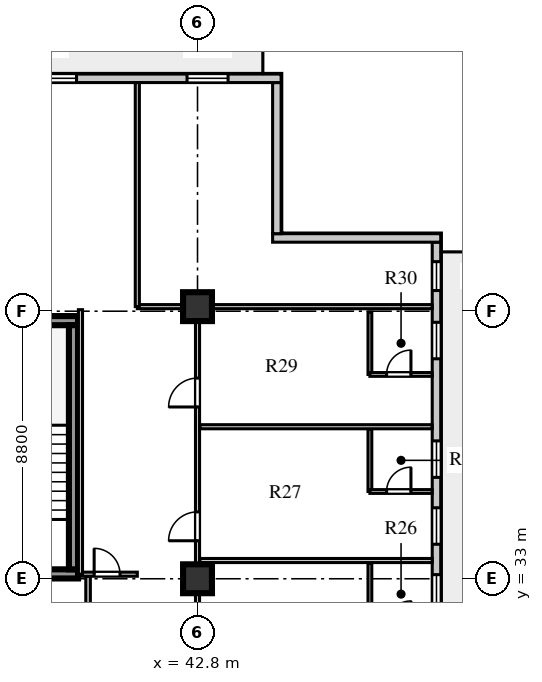
"""IFC4 building model, lengths in metres.
Left out: names, types, materials, properties, quantities, classifications, styles, units other than length and angle.
Written with IfcOpenShell. Run it as: python <this file> out.ifc"""

import sys

from ifc_helpers import new_model, si_unit, direction, frame, frame_2d, origin, origin_2d, place, context, subcontext, project, spatial, rectangle, extrude, element, fill, save


model = new_model("IFC4")
c1 = context("Model", 3, precision=1e-05, world=origin(), true_north=direction((0.0, 1.0)))
c2 = subcontext(c1, "Body", "Model", "MODEL_VIEW")
j1 = project(units=[si_unit("LENGTHUNIT", "METRE"), si_unit("PLANEANGLEUNIT", "RADIAN")], contexts=[c1])
p1 = place(None, origin())
s1 = spatial("IfcSite", under=j1, at=p1, CompositionType="ELEMENT")
p2 = place(p1, origin())
s2 = spatial("IfcBuilding", under=s1, at=p2, CompositionType="ELEMENT")
p3 = place(p2, frame((0.0, 0.0, 188.7)))
s3 = spatial("IfcBuildingStorey", under=s2, at=p3, CompositionType="ELEMENT", Elevation=188.7)
for number, where, z_axis, x_axis in (
    (1, (34.275, 33.16, 0.0), (0.0, 0.0, 1.0), (1.0, 0.0, 0.0)),
    (2, (34.275, 41.49, 0.0), (0.0, 0.0, 1.0), (1.0, 0.0, 0.0)),
):
    element("IfcWall", number, at=place(p3, frame(where, z_axis=z_axis, x_axis=x_axis)), inside=s3, PredefinedType="SHEAR", context=c2, shape_type="SweptSolid", body=[
        extrude(rectangle(XDim=4.595, YDim=0.3, at=frame_2d((2.298, 0.0))), origin(), (0.0, 0.0, 1.0), 3.6),
    ])
p4 = place(p3, frame((38.72, 33.31, 0.0), z_axis=(0.0, 0.0, 1.0), x_axis=(0.0, 1.0, 0.0)))
e3 = element("IfcWall", 3, at=p4, inside=s3, PredefinedType="SHEAR", context=c2, shape_type="SweptSolid", body=[
    extrude(rectangle(XDim=8.03, YDim=0.3, at=frame_2d((4.015, 0.0))), origin(), (0.0, 0.0, 1.0), 3.6),
])
for number, where, z_axis, x_axis in (
    (4, (42.8, 33.0, 0.0), (0.0, 0.0, 1.0), (1.0, 0.0, 0.0)),
    (5, (42.8, 41.95, 0.0), (0.0, 0.0, 1.0), (1.0, 0.0, 0.0)),
):
    element("IfcColumn", number, at=place(p3, frame(where, z_axis=z_axis, x_axis=x_axis)), inside=s3, PredefinedType="COLUMN", context=c2, shape_type="SweptSolid", body=[
        extrude(rectangle(XDim=0.95, YDim=0.95, at=origin_2d()), origin(), (0.0, 0.0, 1.0), 3.6),
    ])
p5 = place(p3, frame((50.66, 13.13, 0.0), z_axis=(0.0, 0.0, 1.0), x_axis=(0.0, 1.0, 0.0)))
e6 = element("IfcWall", 6, at=p5, inside=s3, PredefinedType="STANDARD", context=c2, shape_type="SweptSolid", body=[
    extrude(rectangle(XDim=30.94, YDim=0.28, at=frame_2d((15.47, 0.0))), origin(), (0.0, 0.0, 1.0), 3.6),
])
p6 = place(p5, frame((0.64, 0.0, 0.8)))
e7 = element("IfcOpeningElement", 7, at=p6, cuts=e6, PredefinedType="OPENING", context=c2, shape_type="SweptSolid", body=[
    extrude(rectangle(XDim=0.95, YDim=1.65, at=frame_2d((0.475, 0.825))), frame((0.0, 0.15, 0.0), z_axis=(0.0, -1.0, 0.0), x_axis=(1.0, 0.0, 0.0)), (0.0, 0.0, 1.0), 0.3),
])
p7 = place(p5, frame((2.61, 0.0, 0.0)))
e8 = element("IfcOpeningElement", 8, at=p7, cuts=e6, PredefinedType="OPENING", context=c2, shape_type="SweptSolid", body=[
    extrude(rectangle(XDim=1.0, YDim=2.05, at=frame_2d((0.5, 1.025))), frame((0.0, 0.15, 0.0), z_axis=(0.0, -1.0, 0.0), x_axis=(1.0, 0.0, 0.0)), (0.0, 0.0, 1.0), 0.3),
])
p8 = place(p5, frame((5.005, 0.0, 0.8)))
e9 = element("IfcOpeningElement", 9, at=p8, cuts=e6, PredefinedType="OPENING", context=c2, shape_type="SweptSolid", body=[
    extrude(rectangle(XDim=1.2, YDim=1.75, at=frame_2d((0.6, 0.875))), frame((0.0, 0.15, 0.0), z_axis=(0.0, -1.0, 0.0), x_axis=(1.0, 0.0, 0.0)), (0.0, 0.0, 1.0), 0.3),
])
p9 = place(p5, frame((7.305, 0.0, 0.8)))
e10 = element("IfcOpeningElement", 10, at=p9, cuts=e6, PredefinedType="OPENING", context=c2, shape_type="SweptSolid", body=[
    extrude(rectangle(XDim=1.2, YDim=1.75, at=frame_2d((0.6, 0.875))), frame((0.0, 0.15, 0.0), z_axis=(0.0, -1.0, 0.0), x_axis=(1.0, 0.0, 0.0)), (0.0, 0.0, 1.0), 0.3),
])
p10 = place(p5, frame((9.605, 0.0, 0.8)))
e11 = element("IfcOpeningElement", 11, at=p10, cuts=e6, PredefinedType="OPENING", context=c2, shape_type="SweptSolid", body=[
    extrude(rectangle(XDim=1.2, YDim=1.75, at=frame_2d((0.6, 0.875))), frame((0.0, 0.15, 0.0), z_axis=(0.0, -1.0, 0.0), x_axis=(1.0, 0.0, 0.0)), (0.0, 0.0, 1.0), 0.3),
])
p11 = place(p5, frame((11.905, 0.0, 0.8)))
e12 = element("IfcOpeningElement", 12, at=p11, cuts=e6, PredefinedType="OPENING", context=c2, shape_type="SweptSolid", body=[
    extrude(rectangle(XDim=1.2, YDim=1.75, at=frame_2d((0.6, 0.875))), frame((0.0, 0.15, 0.0), z_axis=(0.0, -1.0, 0.0), x_axis=(1.0, 0.0, 0.0)), (0.0, 0.0, 1.0), 0.3),
])
p12 = place(p5, frame((14.205, 0.0, 0.8)))
e13 = element("IfcOpeningElement", 13, at=p12, cuts=e6, PredefinedType="OPENING", context=c2, shape_type="SweptSolid", body=[
    extrude(rectangle(XDim=1.2, YDim=1.75, at=frame_2d((0.6, 0.875))), frame((0.0, 0.15, 0.0), z_axis=(0.0, -1.0, 0.0), x_axis=(1.0, 0.0, 0.0)), (0.0, 0.0, 1.0), 0.3),
])
p13 = place(p5, frame((16.355, 0.0, 0.8)))
e14 = element("IfcOpeningElement", 14, at=p13, cuts=e6, PredefinedType="OPENING", context=c2, shape_type="SweptSolid", body=[
    extrude(rectangle(XDim=1.5, YDim=2.0, at=frame_2d((0.75, 1.0))), frame((0.0, 0.15, 0.0), z_axis=(0.0, -1.0, 0.0), x_axis=(1.0, 0.0, 0.0)), (0.0, 0.0, 1.0), 0.3),
])
p14 = place(p5, frame((18.805, 0.0, 0.8)))
e15 = element("IfcOpeningElement", 15, at=p14, cuts=e6, PredefinedType="OPENING", context=c2, shape_type="SweptSolid", body=[
    extrude(rectangle(XDim=1.2, YDim=1.75, at=frame_2d((0.6, 0.875))), frame((0.0, 0.15, 0.0), z_axis=(0.0, -1.0, 0.0), x_axis=(1.0, 0.0, 0.0)), (0.0, 0.0, 1.0), 0.3),
])
p15 = place(p5, frame((21.005, 0.0, 0.8)))
e16 = element("IfcOpeningElement", 16, at=p15, cuts=e6, PredefinedType="OPENING", context=c2, shape_type="SweptSolid", body=[
    extrude(rectangle(XDim=1.2, YDim=1.75, at=frame_2d((0.6, 0.875))), frame((0.0, 0.15, 0.0), z_axis=(0.0, -1.0, 0.0), x_axis=(1.0, 0.0, 0.0)), (0.0, 0.0, 1.0), 0.3),
])
p16 = place(p5, frame((23.205, 0.0, 0.8)))
e17 = element("IfcOpeningElement", 17, at=p16, cuts=e6, PredefinedType="OPENING", context=c2, shape_type="SweptSolid", body=[
    extrude(rectangle(XDim=1.2, YDim=1.75, at=frame_2d((0.6, 0.875))), frame((0.0, 0.15, 0.0), z_axis=(0.0, -1.0, 0.0), x_axis=(1.0, 0.0, 0.0)), (0.0, 0.0, 1.0), 0.3),
])
p17 = place(p5, frame((27.105, 0.0, 0.8)))
e18 = element("IfcOpeningElement", 18, at=p17, cuts=e6, PredefinedType="OPENING", context=c2, shape_type="SweptSolid", body=[
    extrude(rectangle(XDim=1.2, YDim=1.75, at=frame_2d((0.6, 0.875))), frame((0.0, 0.15, 0.0), z_axis=(0.0, -1.0, 0.0), x_axis=(1.0, 0.0, 0.0)), (0.0, 0.0, 1.0), 0.3),
])
p18 = place(p5, frame((29.35, 0.0, 0.8)))
e19 = element("IfcOpeningElement", 19, at=p18, cuts=e6, PredefinedType="OPENING", context=c2, shape_type="SweptSolid", body=[
    extrude(rectangle(XDim=0.95, YDim=1.65, at=frame_2d((0.475, 0.825))), frame((0.0, 0.15, 0.0), z_axis=(0.0, -1.0, 0.0), x_axis=(1.0, 0.0, 0.0)), (0.0, 0.0, 1.0), 0.3),
])
p19 = place(p3, frame((50.8, 44.21, 0.0), z_axis=(0.0, 0.0, 1.0), x_axis=(-1.0, 0.0, 0.0)))
e20 = element("IfcWall", 20, at=p19, inside=s3, PredefinedType="STANDARD", context=c2, shape_type="SweptSolid", body=[
    extrude(rectangle(XDim=5.53, YDim=0.28, at=frame_2d((2.765, 0.0))), origin(), (0.0, 0.0, 1.0), 3.6),
])
p20 = place(p3, frame((45.41, 44.35, 0.0), z_axis=(0.0, 0.0, 1.0), x_axis=(0.0, 1.0, 0.0)))
e21 = element("IfcWall", 21, at=p20, inside=s3, PredefinedType="STANDARD", context=c2, shape_type="SweptSolid", body=[
    extrude(rectangle(XDim=4.97, YDim=0.28, at=frame_2d((2.485, 0.0))), origin(), (0.0, 0.0, 1.0), 3.6),
])
p21 = place(p3, frame((45.55, 49.46, 0.0), z_axis=(0.0, 0.0, 1.0), x_axis=(-1.0, 0.0, 0.0)))
e22 = element("IfcWall", 22, at=p21, inside=s3, PredefinedType="STANDARD", context=c2, shape_type="SweptSolid", body=[
    extrude(rectangle(XDim=32.5, YDim=0.28, at=frame_2d((16.25, 0.0))), origin(), (0.0, 0.0, 1.0), 3.6),
])
p22 = place(p21, frame((30.55, 0.0, 0.0)))
e23 = element("IfcOpeningElement", 23, at=p22, cuts=e22, PredefinedType="OPENING", context=c2, shape_type="SweptSolid", body=[
    extrude(rectangle(XDim=1.0, YDim=2.05, at=frame_2d((0.5, 1.025))), frame((0.0, 0.15, 0.0), z_axis=(0.0, -1.0, 0.0), x_axis=(1.0, 0.0, 0.0)), (0.0, 0.0, 1.0), 0.3),
])
p23 = place(p21, frame((24.72, 0.0, 0.8)))
e24 = element("IfcOpeningElement", 24, at=p23, cuts=e22, PredefinedType="OPENING", context=c2, shape_type="SweptSolid", body=[
    extrude(rectangle(XDim=1.5, YDim=2.0, at=frame_2d((0.75, 1.0))), frame((0.0, 0.15, 0.0), z_axis=(0.0, -1.0, 0.0), x_axis=(1.0, 0.0, 0.0)), (0.0, 0.0, 1.0), 0.3),
])
p24 = place(p21, frame((16.045, 0.0, 0.8)))
e25 = element("IfcOpeningElement", 25, at=p24, cuts=e22, PredefinedType="OPENING", context=c2, shape_type="SweptSolid", body=[
    extrude(rectangle(XDim=1.2, YDim=1.75, at=frame_2d((0.6, 0.875))), frame((0.0, 0.15, 0.0), z_axis=(0.0, -1.0, 0.0), x_axis=(1.0, 0.0, 0.0)), (0.0, 0.0, 1.0), 0.3),
])
p25 = place(p21, frame((11.295, 0.0, 0.8)))
e26 = element("IfcOpeningElement", 26, at=p25, cuts=e22, PredefinedType="OPENING", context=c2, shape_type="SweptSolid", body=[
    extrude(rectangle(XDim=1.2, YDim=1.75, at=frame_2d((0.6, 0.875))), frame((0.0, 0.15, 0.0), z_axis=(0.0, -1.0, 0.0), x_axis=(1.0, 0.0, 0.0)), (0.0, 0.0, 1.0), 0.3),
])
p26 = place(p21, frame((6.73, 0.0, 0.8)))
e27 = element("IfcOpeningElement", 27, at=p26, cuts=e22, PredefinedType="OPENING", context=c2, shape_type="SweptSolid", body=[
    extrude(rectangle(XDim=2.1, YDim=1.95, at=frame_2d((1.05, 0.975))), frame((0.0, 0.15, 0.0), z_axis=(0.0, -1.0, 0.0), x_axis=(1.0, 0.0, 0.0)), (0.0, 0.0, 1.0), 0.3),
])
p27 = place(p21, frame((1.745, 0.0, 0.8)))
e28 = element("IfcOpeningElement", 28, at=p27, cuts=e22, PredefinedType="OPENING", context=c2, shape_type="SweptSolid", body=[
    extrude(rectangle(XDim=1.35, YDim=1.9, at=frame_2d((0.675, 0.95))), frame((0.0, 0.15, 0.0), z_axis=(0.0, -1.0, 0.0), x_axis=(1.0, 0.0, 0.0)), (0.0, 0.0, 1.0), 0.3),
])
p28 = place(p3, frame((39.2, 28.86, 0.0), z_axis=(0.0, 0.0, 1.0), x_axis=(0.0, 1.0, 0.0)))
e29 = element("IfcWall", 29, at=p28, inside=s3, PredefinedType="PARTITIONING", context=c2, shape_type="SweptSolid", body=[
    extrude(rectangle(XDim=4.22, YDim=0.15, at=frame_2d((2.11, 0.0))), origin(), (0.0, 0.0, 1.0), 3.6),
])
p29 = place(p3, frame((42.8, 15.25, 0.0), z_axis=(0.0, 0.0, 1.0), x_axis=(0.0, 1.0, 0.0)))
e30 = element("IfcWall", 30, at=p29, inside=s3, PredefinedType="PARTITIONING", context=c2, shape_type="SweptSolid", body=[
    extrude(rectangle(XDim=26.7, YDim=0.135, at=frame_2d((13.35, 0.0))), origin(), (0.0, 0.0, 1.0), 2.95),
])
p30 = place(p29, frame((0.75, 0.0, 0.0)))
e31 = element("IfcOpeningElement", 31, at=p30, cuts=e30, PredefinedType="OPENING", context=c2, shape_type="SweptSolid", body=[
    extrude(rectangle(XDim=0.95, YDim=2.1, at=frame_2d((0.475, 1.05))), frame((0.0, 0.078, 0.0), z_axis=(0.0, -1.0, 0.0), x_axis=(1.0, 0.0, 0.0)), (0.0, 0.0, 1.0), 0.155),
])
p31 = place(p29, frame((5.2, 0.0, 0.0)))
e32 = element("IfcOpeningElement", 32, at=p31, cuts=e30, PredefinedType="OPENING", context=c2, shape_type="SweptSolid", body=[
    extrude(rectangle(XDim=0.95, YDim=2.1, at=frame_2d((0.475, 1.05))), frame((0.0, 0.078, 0.0), z_axis=(0.0, -1.0, 0.0), x_axis=(1.0, 0.0, 0.0)), (0.0, 0.0, 1.0), 0.155),
])
p32 = place(p29, frame((9.8, 0.0, 0.0)))
e33 = element("IfcOpeningElement", 33, at=p32, cuts=e30, PredefinedType="OPENING", context=c2, shape_type="SweptSolid", body=[
    extrude(rectangle(XDim=0.95, YDim=2.1, at=frame_2d((0.475, 1.05))), frame((0.0, 0.078, 0.0), z_axis=(0.0, -1.0, 0.0), x_axis=(1.0, 0.0, 0.0)), (0.0, 0.0, 1.0), 0.155),
])
p33 = place(p29, frame((14.4, 0.0, 0.0)))
e34 = element("IfcOpeningElement", 34, at=p33, cuts=e30, PredefinedType="OPENING", context=c2, shape_type="SweptSolid", body=[
    extrude(rectangle(XDim=0.95, YDim=2.1, at=frame_2d((0.475, 1.05))), frame((0.0, 0.078, 0.0), z_axis=(0.0, -1.0, 0.0), x_axis=(1.0, 0.0, 0.0)), (0.0, 0.0, 1.0), 0.155),
])
p34 = place(p29, frame((19.0, 0.0, 0.0)))
e35 = element("IfcOpeningElement", 35, at=p34, cuts=e30, PredefinedType="OPENING", context=c2, shape_type="SweptSolid", body=[
    extrude(rectangle(XDim=0.95, YDim=2.1, at=frame_2d((0.475, 1.05))), frame((0.0, 0.078, 0.0), z_axis=(0.0, -1.0, 0.0), x_axis=(1.0, 0.0, 0.0)), (0.0, 0.0, 1.0), 0.155),
])
p35 = place(p29, frame((23.4, 0.0, 0.0)))
e36 = element("IfcOpeningElement", 36, at=p35, cuts=e30, PredefinedType="OPENING", context=c2, shape_type="SweptSolid", body=[
    extrude(rectangle(XDim=0.95, YDim=2.1, at=frame_2d((0.475, 1.05))), frame((0.0, 0.078, 0.0), z_axis=(0.0, -1.0, 0.0), x_axis=(1.0, 0.0, 0.0)), (0.0, 0.0, 1.0), 0.155),
])
p36 = place(p3, frame((40.82, 41.95, 0.0), z_axis=(0.0, 0.0, 1.0), x_axis=(1.0, 0.0, 0.0)))
e37 = element("IfcWall", 37, at=p36, inside=s3, PredefinedType="PARTITIONING", context=c2, shape_type="SweptSolid", body=[
    extrude(rectangle(XDim=9.7, YDim=0.135, at=frame_2d((4.85, 0.0))), origin(), (0.0, 0.0, 1.0), 2.95),
])
p37 = place(p3, frame((48.47, 31.47, 0.0), z_axis=(0.0, 0.0, 1.0), x_axis=(0.0, 1.0, 0.0)))
e38 = element("IfcWall", 38, at=p37, inside=s3, PredefinedType="PLUMBINGWALL", context=c2, shape_type="SweptSolid", body=[
    extrude(rectangle(XDim=2.05, YDim=0.125, at=frame_2d((1.025, 0.0))), origin(), (0.0, 0.0, 1.0), 3.6),
])
p38 = place(p3, frame((42.88, 33.6, 0.0), z_axis=(0.0, 0.0, 1.0), x_axis=(1.0, 0.0, 0.0)))
e39 = element("IfcWall", 39, at=p38, inside=s3, PredefinedType="PARTITIONING", context=c2, shape_type="SweptSolid", body=[
    extrude(rectangle(XDim=7.64, YDim=0.135, at=frame_2d((3.82, 0.0))), origin(), (0.0, 0.0, 1.0), 3.6),
])
p39 = place(p3, frame((48.47, 35.87, 0.0), z_axis=(0.0, 0.0, 1.0), x_axis=(0.0, 1.0, 0.0)))
e40 = element("IfcWall", 40, at=p39, inside=s3, PredefinedType="PLUMBINGWALL", context=c2, shape_type="SweptSolid", body=[
    extrude(rectangle(XDim=2.05, YDim=0.125, at=frame_2d((1.025, 0.0))), origin(), (0.0, 0.0, 1.0), 3.6),
])
p40 = place(p3, frame((48.47, 35.87, 0.0), z_axis=(0.0, 0.0, 1.0), x_axis=(1.0, 0.0, 0.0)))
e41 = element("IfcWall", 41, at=p40, inside=s3, PredefinedType="PLUMBINGWALL", context=c2, shape_type="SweptSolid", body=[
    extrude(rectangle(XDim=2.05, YDim=0.125, at=frame_2d((1.025, 0.0))), origin(), (0.0, 0.0, 1.0), 3.6),
])
p41 = place(p40, frame((0.55, 0.0, 0.0)))
e42 = element("IfcOpeningElement", 42, at=p41, cuts=e41, PredefinedType="OPENING", context=c2, shape_type="SweptSolid", body=[
    extrude(rectangle(XDim=0.8, YDim=2.05, at=frame_2d((0.4, 1.025))), frame((0.0, 0.073, 0.0), z_axis=(0.0, -1.0, 0.0), x_axis=(1.0, 0.0, 0.0)), (0.0, 0.0, 1.0), 0.145),
])
p42 = place(p3, frame((42.88, 38.0, 0.0), z_axis=(0.0, 0.0, 1.0), x_axis=(1.0, 0.0, 0.0)))
e43 = element("IfcWall", 43, at=p42, inside=s3, PredefinedType="PARTITIONING", context=c2, shape_type="SweptSolid", body=[
    extrude(rectangle(XDim=7.64, YDim=0.135, at=frame_2d((3.82, 0.0))), origin(), (0.0, 0.0, 1.0), 3.6),
])
p43 = place(p3, frame((48.47, 39.72, 0.0), z_axis=(0.0, 0.0, 1.0), x_axis=(0.0, 1.0, 0.0)))
e44 = element("IfcWall", 44, at=p43, inside=s3, PredefinedType="PLUMBINGWALL", context=c2, shape_type="SweptSolid", body=[
    extrude(rectangle(XDim=2.05, YDim=0.125, at=frame_2d((1.025, 0.0))), origin(), (0.0, 0.0, 1.0), 3.6),
])
p44 = place(p3, frame((48.47, 39.72, 0.0), z_axis=(0.0, 0.0, 1.0), x_axis=(1.0, 0.0, 0.0)))
e45 = element("IfcWall", 45, at=p44, inside=s3, PredefinedType="PLUMBINGWALL", context=c2, shape_type="SweptSolid", body=[
    extrude(rectangle(XDim=2.05, YDim=0.125, at=frame_2d((1.025, 0.0))), origin(), (0.0, 0.0, 1.0), 3.6),
])
p45 = place(p44, frame((0.55, 0.0, 0.0)))
e46 = element("IfcOpeningElement", 46, at=p45, cuts=e45, PredefinedType="OPENING", context=c2, shape_type="SweptSolid", body=[
    extrude(rectangle(XDim=0.8, YDim=2.05, at=frame_2d((0.4, 1.025))), frame((0.0, 0.073, 0.0), z_axis=(0.0, -1.0, 0.0), x_axis=(1.0, 0.0, 0.0)), (0.0, 0.0, 1.0), 0.145),
])
p46 = place(p3, frame((38.95, 33.15, 0.0), z_axis=(0.0, 0.0, 1.0), x_axis=(1.0, 0.0, 0.0)))
e47 = element("IfcWall", 47, at=p46, inside=s3, PredefinedType="PARTITIONING", context=c2, shape_type="SweptSolid", body=[
    extrude(rectangle(XDim=1.87, YDim=0.135, at=frame_2d((0.935, 0.0))), origin(), (0.0, 0.0, 1.0), 3.6),
])
p47 = place(p46, frame((0.45, 0.0, 0.0)))
e48 = element("IfcOpeningElement", 48, at=p47, cuts=e47, PredefinedType="OPENING", context=c2, shape_type="SweptSolid", body=[
    extrude(rectangle(XDim=0.85, YDim=2.05, at=frame_2d((0.425, 1.025))), frame((0.0, 0.078, 0.0), z_axis=(0.0, -1.0, 0.0), x_axis=(1.0, 0.0, 0.0)), (0.0, 0.0, 1.0), 0.155),
])
p48 = place(p3, frame((38.95, 33.15, 0.0), z_axis=(0.0, 0.0, 1.0), x_axis=(0.0, 1.0, 0.0)))
e49 = element("IfcWall", 49, at=p48, inside=s3, PredefinedType="PARTITIONING", context=c2, shape_type="SweptSolid", body=[
    extrude(rectangle(XDim=8.7, YDim=0.135, at=frame_2d((4.35, 0.0))), origin(), (0.0, 0.0, 1.0), 3.6),
])
p49 = place(p3, frame((40.82, 41.95, 0.0), z_axis=(0.0, 0.0, 1.0), x_axis=(0.0, 1.0, 0.0)))
e50 = element("IfcWall", 50, at=p49, inside=s3, PredefinedType="PARTITIONING", context=c2, shape_type="SweptSolid", body=[
    extrude(rectangle(XDim=7.37, YDim=0.135, at=frame_2d((3.685, 0.0))), origin(), (0.0, 0.0, 1.0), 3.6),
])
p50 = place(p14, origin())
e51 = element("IfcWindow", 51, at=p50, inside=s3, PartitioningType="SINGLE_PANEL", PredefinedType="WINDOW", context=c2, shape_type="SweptSolid", body=[
    extrude(rectangle(XDim=1.2, YDim=1.75, at=frame_2d((0.6, 0.875))), frame((0.0, 0.03, 0.0), z_axis=(0.0, -1.0, 0.0), x_axis=(1.0, 0.0, 0.0)), (0.0, 0.0, 1.0), 0.06),
])
fill(e15, e51)
p51 = place(p15, origin())
e52 = element("IfcWindow", 52, at=p51, inside=s3, PartitioningType="SINGLE_PANEL", PredefinedType="WINDOW", context=c2, shape_type="SweptSolid", body=[
    extrude(rectangle(XDim=1.2, YDim=1.75, at=frame_2d((0.6, 0.875))), frame((0.0, 0.03, 0.0), z_axis=(0.0, -1.0, 0.0), x_axis=(1.0, 0.0, 0.0)), (0.0, 0.0, 1.0), 0.06),
])
fill(e16, e52)
p52 = place(p16, origin())
e53 = element("IfcWindow", 53, at=p52, inside=s3, PartitioningType="SINGLE_PANEL", PredefinedType="WINDOW", context=c2, shape_type="SweptSolid", body=[
    extrude(rectangle(XDim=1.2, YDim=1.75, at=frame_2d((0.6, 0.875))), frame((0.0, 0.03, 0.0), z_axis=(0.0, -1.0, 0.0), x_axis=(1.0, 0.0, 0.0)), (0.0, 0.0, 1.0), 0.06),
])
fill(e17, e53)
p53 = place(p17, origin())
e54 = element("IfcWindow", 54, at=p53, inside=s3, PartitioningType="SINGLE_PANEL", PredefinedType="WINDOW", context=c2, shape_type="SweptSolid", body=[
    extrude(rectangle(XDim=1.2, YDim=1.75, at=frame_2d((0.6, 0.875))), frame((0.0, 0.03, 0.0), z_axis=(0.0, -1.0, 0.0), x_axis=(1.0, 0.0, 0.0)), (0.0, 0.0, 1.0), 0.06),
])
fill(e18, e54)
p54 = place(p18, origin())
e55 = element("IfcWindow", 55, at=p54, inside=s3, PartitioningType="SINGLE_PANEL", PredefinedType="WINDOW", context=c2, shape_type="SweptSolid", body=[
    extrude(rectangle(XDim=0.95, YDim=1.65, at=frame_2d((0.475, 0.825))), frame((0.0, 0.03, 0.0), z_axis=(0.0, -1.0, 0.0), x_axis=(1.0, 0.0, 0.0)), (0.0, 0.0, 1.0), 0.06),
])
fill(e19, e55)
p55 = place(p26, origin())
e56 = element("IfcWindow", 56, at=p55, inside=s3, PartitioningType="SINGLE_PANEL", PredefinedType="WINDOW", context=c2, shape_type="SweptSolid", body=[
    extrude(rectangle(XDim=2.1, YDim=1.95, at=frame_2d((1.05, 0.975))), frame((0.0, 0.03, 0.0), z_axis=(0.0, -1.0, 0.0), x_axis=(1.0, 0.0, 0.0)), (0.0, 0.0, 1.0), 0.06),
])
fill(e27, e56)
p56 = place(p27, origin())
e57 = element("IfcWindow", 57, at=p56, inside=s3, PartitioningType="SINGLE_PANEL", PredefinedType="WINDOW", context=c2, shape_type="SweptSolid", body=[
    extrude(rectangle(XDim=1.35, YDim=1.9, at=frame_2d((0.675, 0.95))), frame((0.0, 0.03, 0.0), z_axis=(0.0, -1.0, 0.0), x_axis=(1.0, 0.0, 0.0)), (0.0, 0.0, 1.0), 0.06),
])
fill(e28, e57)
p57 = place(p34, origin())
e58 = element("IfcDoor", 58, at=p57, inside=s3, OperationType="SINGLE_SWING_LEFT", PredefinedType="DOOR", context=c2, shape_type="SweptSolid", body=[
    extrude(rectangle(XDim=0.95, YDim=2.1, at=frame_2d((0.475, 1.05))), frame((0.0, 0.025, 0.0), z_axis=(0.0, -1.0, 0.0), x_axis=(1.0, 0.0, 0.0)), (0.0, 0.0, 1.0), 0.05),
])
fill(e35, e58)
p58 = place(p41, frame((0.8, 0.0, 0.0), z_axis=(0.0, 0.0, 1.0), x_axis=(-1.0, 0.0, 0.0)))
e59 = element("IfcDoor", 59, at=p58, inside=s3, OperationType="SINGLE_SWING_LEFT", PredefinedType="DOOR", context=c2, shape_type="SweptSolid", body=[
    extrude(rectangle(XDim=0.8, YDim=2.05, at=frame_2d((0.4, 1.025))), frame((0.0, 0.025, 0.0), z_axis=(0.0, -1.0, 0.0), x_axis=(1.0, 0.0, 0.0)), (0.0, 0.0, 1.0), 0.05),
])
fill(e42, e59)
p59 = place(p35, origin())
e60 = element("IfcDoor", 60, at=p59, inside=s3, OperationType="SINGLE_SWING_LEFT", PredefinedType="DOOR", context=c2, shape_type="SweptSolid", body=[
    extrude(rectangle(XDim=0.95, YDim=2.1, at=frame_2d((0.475, 1.05))), frame((0.0, 0.025, 0.0), z_axis=(0.0, -1.0, 0.0), x_axis=(1.0, 0.0, 0.0)), (0.0, 0.0, 1.0), 0.05),
])
fill(e36, e60)
p60 = place(p45, frame((0.8, 0.0, 0.0), z_axis=(0.0, 0.0, 1.0), x_axis=(-1.0, 0.0, 0.0)))
e61 = element("IfcDoor", 61, at=p60, inside=s3, OperationType="SINGLE_SWING_LEFT", PredefinedType="DOOR", context=c2, shape_type="SweptSolid", body=[
    extrude(rectangle(XDim=0.8, YDim=2.05, at=frame_2d((0.4, 1.025))), frame((0.0, 0.025, 0.0), z_axis=(0.0, -1.0, 0.0), x_axis=(1.0, 0.0, 0.0)), (0.0, 0.0, 1.0), 0.05),
])
fill(e46, e61)
p61 = place(p47, origin())
e62 = element("IfcDoor", 62, at=p61, inside=s3, OperationType="SINGLE_SWING_LEFT", PredefinedType="DOOR", context=c2, shape_type="SweptSolid", body=[
    extrude(rectangle(XDim=0.85, YDim=2.05, at=frame_2d((0.425, 1.025))), frame((0.0, 0.025, 0.0), z_axis=(0.0, -1.0, 0.0), x_axis=(1.0, 0.0, 0.0)), (0.0, 0.0, 1.0), 0.05),
])
fill(e48, e62)
save(model, sys.argv[1])
